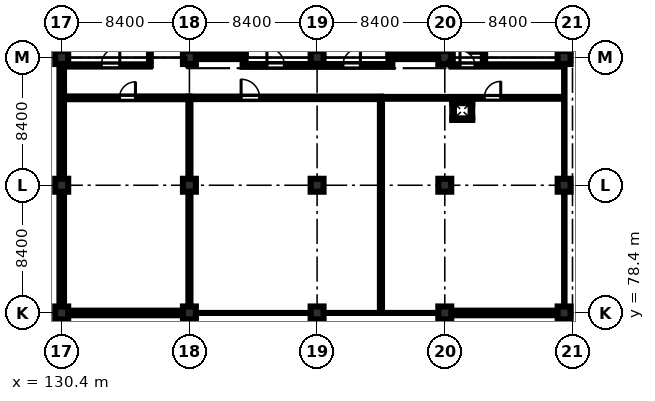
"""IFC4 building model, lengths in metres.
Left out: names, types, materials, properties, quantities, classifications, styles, units other than length and angle.
Written with IfcOpenShell. Run it as: python <this file> out.ifc"""

import sys

from ifc_helpers import new_model, si_unit, direction, frame, frame_2d, origin, origin_2d, place, context, subcontext, project, spatial, rectangle, extrude, element, fill, save


model = new_model("IFC4")
c1 = context("Model", 3, precision=1e-05, world=origin(), true_north=direction((0.0, 1.0)))
c2 = subcontext(c1, "Body", "Model", "MODEL_VIEW")
j1 = project(units=[si_unit("LENGTHUNIT", "METRE"), si_unit("PLANEANGLEUNIT", "RADIAN")], contexts=[c1])
p1 = place(None, origin())
s1 = spatial("IfcSite", under=j1, at=p1, CompositionType="ELEMENT")
p2 = place(p1, origin())
s2 = spatial("IfcBuilding", under=s1, at=p2, CompositionType="ELEMENT")
p3 = place(p2, frame((0.0, 0.0, 36.0)))
s3 = spatial("IfcBuildingStorey", under=s2, at=p3, CompositionType="ELEMENT", Elevation=36.0)
for number, where, z_axis, x_axis in (
    (1, (130.4, 78.4, 0.0), (0.0, 0.0, 1.0), (1.0, 0.0, 0.0)),
    (2, (130.4, 86.8, 0.0), (0.0, 0.0, 1.0), (1.0, 0.0, 0.0)),
    (3, (130.4, 95.2, 0.0), (0.0, 0.0, 1.0), (1.0, 0.0, 0.0)),
    (4, (138.8, 78.4, 0.0), (0.0, 0.0, 1.0), (1.0, 0.0, 0.0)),
    (5, (138.8, 86.8, 0.0), (0.0, 0.0, 1.0), (1.0, 0.0, 0.0)),
    (6, (138.8, 95.2, 0.0), (0.0, 0.0, 1.0), (1.0, 0.0, 0.0)),
    (7, (147.2, 78.4, 0.0), (0.0, 0.0, 1.0), (1.0, 0.0, 0.0)),
    (8, (147.2, 86.8, 0.0), (0.0, 0.0, 1.0), (1.0, 0.0, 0.0)),
    (9, (147.2, 95.2, 0.0), (0.0, 0.0, 1.0), (1.0, 0.0, 0.0)),
    (10, (155.6, 78.4, 0.0), (0.0, 0.0, 1.0), (1.0, 0.0, 0.0)),
    (11, (155.6, 86.8, 0.0), (0.0, 0.0, 1.0), (1.0, 0.0, 0.0)),
    (12, (155.6, 95.2, 0.0), (0.0, 0.0, 1.0), (1.0, 0.0, 0.0)),
    (13, (163.45, 78.4, 0.0), (0.0, 0.0, 1.0), (1.0, 0.0, 0.0)),
    (14, (163.45, 86.8, 0.0), (0.0, 0.0, 1.0), (1.0, 0.0, 0.0)),
    (15, (163.45, 95.2, 0.0), (0.0, 0.0, 1.0), (1.0, 0.0, 0.0)),
):
    element("IfcColumn", number, at=place(p3, frame(where, z_axis=z_axis, x_axis=x_axis)), inside=s3, PredefinedType="COLUMN", context=c2, shape_type="SweptSolid", body=[
        extrude(rectangle(XDim=0.85, YDim=0.85, at=origin_2d()), origin(), (0.0, 0.0, 1.0), 4.02),
    ])
p4 = place(p3, frame((138.7, 95.275, 0.0), z_axis=(0.0, 0.0, 1.0), x_axis=(1.0, 0.0, 0.0)))
e16 = element("IfcWall", 16, at=p4, inside=s3, PredefinedType="SHEAR", context=c2, shape_type="SweptSolid", body=[
    extrude(rectangle(XDim=3.8, YDim=0.35, at=frame_2d((1.9, 0.0))), origin(), (0.0, 0.0, 1.0), 4.02),
])
p5 = place(p3, frame((138.875, 95.45, 0.0), z_axis=(0.0, 0.0, 1.0), x_axis=(0.0, 1.0, 0.0)))
e17 = element("IfcWall", 17, at=p5, inside=s3, PredefinedType="SHEAR", context=c2, shape_type="SweptSolid", body=[
    extrude(rectangle(XDim=7.9, YDim=0.35, at=frame_2d((3.95, 0.0))), origin(), (0.0, 0.0, 1.0), 4.02),
])
p6 = place(p3, frame((142.325, 95.45, 0.0), z_axis=(0.0, 0.0, 1.0), x_axis=(0.0, 1.0, 0.0)))
e18 = element("IfcWall", 18, at=p6, inside=s3, PredefinedType="SHEAR", context=c2, shape_type="SweptSolid", body=[
    extrude(rectangle(XDim=7.9, YDim=0.35, at=frame_2d((3.95, 0.0))), origin(), (0.0, 0.0, 1.0), 4.02),
])
p7 = place(p6, frame((0.22, 0.0, 0.0)))
e19 = element("IfcOpeningElement", 19, at=p7, cuts=e18, PredefinedType="OPENING", context=c2, shape_type="SweptSolid", body=[
    extrude(rectangle(XDim=1.15, YDim=2.15, at=frame_2d((0.575, 1.075))), frame((0.0, 0.185, 0.0), z_axis=(0.0, -1.0, 0.0), x_axis=(1.0, 0.0, 0.0)), (0.0, 0.0, 1.0), 0.37),
])
p8 = place(p3, frame((151.9, 95.275, 0.0), z_axis=(0.0, 0.0, 1.0), x_axis=(1.0, 0.0, 0.0)))
e20 = element("IfcWall", 20, at=p8, inside=s3, PredefinedType="SHEAR", context=c2, shape_type="SweptSolid", body=[
    extrude(rectangle(XDim=3.8, YDim=0.35, at=frame_2d((1.9, 0.0))), origin(), (0.0, 0.0, 1.0), 4.02),
])
p9 = place(p3, frame((152.075, 95.45, 0.0), z_axis=(0.0, 0.0, 1.0), x_axis=(0.0, 1.0, 0.0)))
e21 = element("IfcWall", 21, at=p9, inside=s3, PredefinedType="SHEAR", context=c2, shape_type="SweptSolid", body=[
    extrude(rectangle(XDim=7.9, YDim=0.35, at=frame_2d((3.95, 0.0))), origin(), (0.0, 0.0, 1.0), 4.02),
])
p10 = place(p9, frame((0.35, 0.0, 0.0)))
e22 = element("IfcOpeningElement", 22, at=p10, cuts=e21, PredefinedType="OPENING", context=c2, shape_type="SweptSolid", body=[
    extrude(rectangle(XDim=1.15, YDim=2.15, at=frame_2d((0.575, 1.075))), frame((0.0, 0.185, 0.0), z_axis=(0.0, -1.0, 0.0), x_axis=(1.0, 0.0, 0.0)), (0.0, 0.0, 1.0), 0.37),
])
p11 = place(p3, frame((155.525, 95.45, 0.0), z_axis=(0.0, 0.0, 1.0), x_axis=(0.0, 1.0, 0.0)))
e23 = element("IfcWall", 23, at=p11, inside=s3, PredefinedType="SHEAR", context=c2, shape_type="SweptSolid", body=[
    extrude(rectangle(XDim=7.9, YDim=0.35, at=frame_2d((3.95, 0.0))), origin(), (0.0, 0.0, 1.0), 4.02),
])
p12 = place(p3, frame((138.375, 78.4, 0.0), z_axis=(0.0, 0.0, 1.0), x_axis=(-1.0, 0.0, 0.0)))
e24 = element("IfcWall", 24, at=p12, inside=s3, PredefinedType="STANDARD", context=c2, shape_type="SweptSolid", body=[
    extrude(rectangle(XDim=7.55, YDim=0.3, at=frame_2d((3.775, 0.0))), origin(), (0.0, 0.0, 1.0), 3.32),
])
p13 = place(p12, frame((1.15, 0.0, 0.95)))
e25 = element("IfcOpeningElement", 25, at=p13, cuts=e24, PredefinedType="OPENING", context=c2, shape_type="SweptSolid", body=[
    extrude(rectangle(XDim=2.15, YDim=1.95, at=frame_2d((1.075, 0.975))), frame((0.0, 0.16, 0.0), z_axis=(0.0, -1.0, 0.0), x_axis=(1.0, 0.0, 0.0)), (0.0, 0.0, 1.0), 0.32),
])
p14 = place(p3, frame((163.025, 78.4, 0.0), z_axis=(0.0, 0.0, 1.0), x_axis=(-1.0, 0.0, 0.0)))
e26 = element("IfcWall", 26, at=p14, inside=s3, PredefinedType="STANDARD", context=c2, shape_type="SweptSolid", body=[
    extrude(rectangle(XDim=7.0, YDim=0.3, at=frame_2d((3.5, 0.0))), origin(), (0.0, 0.0, 1.0), 3.32),
])
p15 = place(p14, frame((1.15, 0.0, 0.95)))
e27 = element("IfcOpeningElement", 27, at=p15, cuts=e26, PredefinedType="OPENING", context=c2, shape_type="SweptSolid", body=[
    extrude(rectangle(XDim=2.15, YDim=1.95, at=frame_2d((1.075, 0.975))), frame((0.0, 0.16, 0.0), z_axis=(0.0, -1.0, 0.0), x_axis=(1.0, 0.0, 0.0)), (0.0, 0.0, 1.0), 0.32),
])
p16 = place(p3, frame((130.4, 78.825, 0.0), z_axis=(0.0, 0.0, 1.0), x_axis=(0.0, 1.0, 0.0)))
e28 = element("IfcWall", 28, at=p16, inside=s3, PredefinedType="STANDARD", context=c2, shape_type="SweptSolid", body=[
    extrude(rectangle(XDim=7.55, YDim=0.3, at=frame_2d((3.775, 0.0))), origin(), (0.0, 0.0, 1.0), 3.32),
])
p17 = place(p16, frame((2.4, 0.0, 0.95)))
e29 = element("IfcOpeningElement", 29, at=p17, cuts=e28, PredefinedType="OPENING", context=c2, shape_type="SweptSolid", body=[
    extrude(rectangle(XDim=1.5, YDim=1.8, at=frame_2d((0.75, 0.9))), frame((0.0, 0.16, 0.0), z_axis=(0.0, -1.0, 0.0), x_axis=(1.0, 0.0, 0.0)), (0.0, 0.0, 1.0), 0.32),
])
p18 = place(p3, frame((130.4, 87.225, 0.0), z_axis=(0.0, 0.0, 1.0), x_axis=(0.0, 1.0, 0.0)))
e30 = element("IfcWall", 30, at=p18, inside=s3, PredefinedType="STANDARD", context=c2, shape_type="SweptSolid", body=[
    extrude(rectangle(XDim=7.55, YDim=0.3, at=frame_2d((3.775, 0.0))), origin(), (0.0, 0.0, 1.0), 3.32),
])
p19 = place(p18, frame((2.4, 0.0, 0.95)))
e31 = element("IfcOpeningElement", 31, at=p19, cuts=e30, PredefinedType="OPENING", context=c2, shape_type="SweptSolid", body=[
    extrude(rectangle(XDim=1.5, YDim=1.8, at=frame_2d((0.75, 0.9))), frame((0.0, 0.16, 0.0), z_axis=(0.0, -1.0, 0.0), x_axis=(1.0, 0.0, 0.0)), (0.0, 0.0, 1.0), 0.32),
])
p20 = place(p3, frame((142.3, 94.68, 0.0), z_axis=(0.0, 0.0, 1.0), x_axis=(1.0, 0.0, 0.0)))
e32 = element("IfcWall", 32, at=p20, inside=s3, PredefinedType="STANDARD", context=c2, shape_type="SweptSolid", body=[
    extrude(rectangle(XDim=4.8, YDim=0.18, at=frame_2d((2.4, 0.0))), origin(), (0.0, 0.0, 1.0), 4.02),
])
p21 = place(p20, frame((1.6, 0.0, 0.0)))
e33 = element("IfcOpeningElement", 33, at=p21, cuts=e32, PredefinedType="OPENING", context=c2, shape_type="SweptSolid", body=[
    extrude(rectangle(XDim=1.15, YDim=2.15, at=frame_2d((0.575, 1.075))), frame((0.0, 0.1, 0.0), z_axis=(0.0, -1.0, 0.0), x_axis=(1.0, 0.0, 0.0)), (0.0, 0.0, 1.0), 0.2),
])
p22 = place(p3, frame((147.3, 94.68, 0.0), z_axis=(0.0, 0.0, 1.0), x_axis=(1.0, 0.0, 0.0)))
e34 = element("IfcWall", 34, at=p22, inside=s3, PredefinedType="STANDARD", context=c2, shape_type="SweptSolid", body=[
    extrude(rectangle(XDim=4.85, YDim=0.18, at=frame_2d((2.425, 0.0))), origin(), (0.0, 0.0, 1.0), 4.02),
])
p23 = place(p22, frame((1.6, 0.0, 0.0)))
e35 = element("IfcOpeningElement", 35, at=p23, cuts=e34, PredefinedType="OPENING", context=c2, shape_type="SweptSolid", body=[
    extrude(rectangle(XDim=1.15, YDim=2.15, at=frame_2d((0.575, 1.075))), frame((0.0, 0.1, 0.0), z_axis=(0.0, -1.0, 0.0), x_axis=(1.0, 0.0, 0.0)), (0.0, 0.0, 1.0), 0.2),
])
p24 = place(p3, frame((156.05, 94.68, 0.0), z_axis=(0.0, 0.0, 1.0), x_axis=(1.0, 0.0, 0.0)))
e36 = element("IfcWall", 36, at=p24, inside=s3, PredefinedType="PARTITIONING", context=c2, shape_type="SweptSolid", body=[
    extrude(rectangle(XDim=7.15, YDim=0.15, at=frame_2d((3.575, 0.0))), origin(), (0.0, 0.0, 1.0), 4.02),
])
p25 = place(p24, frame((0.55, 0.0, 0.0)))
e37 = element("IfcOpeningElement", 37, at=p25, cuts=e36, PredefinedType="OPENING", context=c2, shape_type="SweptSolid", body=[
    extrude(rectangle(XDim=0.98, YDim=2.12, at=frame_2d((0.49, 1.06))), frame((0.0, 0.085, 0.0), z_axis=(0.0, -1.0, 0.0), x_axis=(1.0, 0.0, 0.0)), (0.0, 0.0, 1.0), 0.17),
])
p26 = place(p3, frame((158.18, 94.68, 0.0), z_axis=(0.0, 0.0, 1.0), x_axis=(0.0, 1.0, 0.0)))
e38 = element("IfcWall", 38, at=p26, inside=s3, PredefinedType="PARTITIONING", context=c2, shape_type="SweptSolid", body=[
    extrude(rectangle(XDim=8.57, YDim=0.15, at=frame_2d((4.285, 0.0))), origin(), (0.0, 0.0, 1.0), 4.02),
])
p27 = place(p26, frame((0.8, 0.0, 0.0)))
e39 = element("IfcOpeningElement", 39, at=p27, cuts=e38, PredefinedType="OPENING", context=c2, shape_type="SweptSolid", body=[
    extrude(rectangle(XDim=1.0, YDim=2.12, at=frame_2d((0.5, 1.06))), frame((0.0, 0.085, 0.0), z_axis=(0.0, -1.0, 0.0), x_axis=(1.0, 0.0, 0.0)), (0.0, 0.0, 1.0), 0.17),
])
p28 = place(p26, frame((3.5, 0.0, 0.0)))
e40 = element("IfcOpeningElement", 40, at=p28, cuts=e38, PredefinedType="OPENING", context=c2, shape_type="SweptSolid", body=[
    extrude(rectangle(XDim=0.92, YDim=2.1, at=frame_2d((0.46, 1.05))), frame((0.0, 0.085, 0.0), z_axis=(0.0, -1.0, 0.0), x_axis=(1.0, 0.0, 0.0)), (0.0, 0.0, 1.0), 0.17),
])
p29 = place(p26, frame((6.4, 0.0, 0.0)))
e41 = element("IfcOpeningElement", 41, at=p29, cuts=e38, PredefinedType="OPENING", context=c2, shape_type="SweptSolid", body=[
    extrude(rectangle(XDim=0.92, YDim=2.1, at=frame_2d((0.46, 1.05))), frame((0.0, 0.085, 0.0), z_axis=(0.0, -1.0, 0.0), x_axis=(1.0, 0.0, 0.0)), (0.0, 0.0, 1.0), 0.17),
])
p30 = place(p3, frame((156.05, 94.68, 0.0), z_axis=(0.0, 0.0, 1.0), x_axis=(0.0, 1.0, 0.0)))
e42 = element("IfcWall", 42, at=p30, inside=s3, PredefinedType="PARTITIONING", context=c2, shape_type="SweptSolid", body=[
    extrude(rectangle(XDim=8.57, YDim=0.15, at=frame_2d((4.285, 0.0))), origin(), (0.0, 0.0, 1.0), 4.02),
])
p31 = place(p3, frame((136.2, 94.68, 0.0), z_axis=(0.0, 0.0, 1.0), x_axis=(0.0, 1.0, 0.0)))
e43 = element("IfcWall", 43, at=p31, inside=s3, PredefinedType="PARTITIONING", context=c2, shape_type="SweptSolid", body=[
    extrude(rectangle(XDim=9.07, YDim=0.12, at=frame_2d((4.535, 0.0))), origin(), (0.0, 0.0, 1.0), 4.02),
])
p32 = place(p3, frame((130.8, 94.68, 0.0), z_axis=(0.0, 0.0, 1.0), x_axis=(1.0, 0.0, 0.0)))
e44 = element("IfcWall", 44, at=p32, inside=s3, PredefinedType="PARTITIONING", context=c2, shape_type="SweptSolid", body=[
    extrude(rectangle(XDim=5.4, YDim=0.145, at=frame_2d((2.7, 0.0))), origin(), (0.0, 0.0, 1.0), 4.02),
])
p33 = place(p32, frame((2.2, 0.0, 0.0)))
e45 = element("IfcOpeningElement", 45, at=p33, cuts=e44, PredefinedType="OPENING", context=c2, shape_type="SweptSolid", body=[
    extrude(rectangle(XDim=1.22, YDim=2.2, at=frame_2d((0.61, 1.1))), frame((0.0, 0.083, 0.0), z_axis=(0.0, -1.0, 0.0), x_axis=(1.0, 0.0, 0.0)), (0.0, 0.0, 1.0), 0.165),
])
p34 = place(p3, frame((130.55, 92.55, 0.0), z_axis=(0.0, 0.0, 1.0), x_axis=(1.0, 0.0, 0.0)))
e46 = element("IfcWall", 46, at=p34, inside=s3, PredefinedType="STANDARD", context=c2, shape_type="SweptSolid", body=[
    extrude(rectangle(XDim=8.25, YDim=0.18, at=frame_2d((4.125, 0.0))), origin(), (0.0, 0.0, 1.0), 4.02),
])
p35 = place(p34, frame((3.65, 0.0, 0.0)))
e47 = element("IfcOpeningElement", 47, at=p35, cuts=e46, PredefinedType="OPENING", context=c2, shape_type="SweptSolid", body=[
    extrude(rectangle(XDim=1.05, YDim=2.15, at=frame_2d((0.525, 1.075))), frame((0.0, 0.1, 0.0), z_axis=(0.0, -1.0, 0.0), x_axis=(1.0, 0.0, 0.0)), (0.0, 0.0, 1.0), 0.2),
])
p36 = place(p3, frame((138.8, 92.55, 0.0), z_axis=(0.0, 0.0, 1.0), x_axis=(1.0, 0.0, 0.0)))
e48 = element("IfcWall", 48, at=p36, inside=s3, PredefinedType="PARTITIONING", context=c2, shape_type="SweptSolid", body=[
    extrude(rectangle(XDim=12.6, YDim=0.165, at=frame_2d((6.3, 0.0))), origin(), (0.0, 0.0, 1.0), 4.02),
])
p37 = place(p36, frame((3.4, 0.0, 0.0)))
e49 = element("IfcOpeningElement", 49, at=p37, cuts=e48, PredefinedType="OPENING", context=c2, shape_type="SweptSolid", body=[
    extrude(rectangle(XDim=1.22, YDim=2.2, at=frame_2d((0.61, 1.1))), frame((0.0, 0.093, 0.0), z_axis=(0.0, -1.0, 0.0), x_axis=(1.0, 0.0, 0.0)), (0.0, 0.0, 1.0), 0.185),
])
p38 = place(p3, frame((138.8, 78.55, 0.0), z_axis=(0.0, 0.0, 1.0), x_axis=(0.0, 1.0, 0.0)))
e50 = element("IfcWall", 50, at=p38, inside=s3, PredefinedType="PARTITIONING", context=c2, shape_type="SweptSolid", body=[
    extrude(rectangle(XDim=14.0, YDim=0.135, at=frame_2d((7.0, 0.0))), origin(), (0.0, 0.0, 1.0), 3.32),
])
p39 = place(p3, frame((151.4, 92.55, 0.0), z_axis=(0.0, 0.0, 1.0), x_axis=(1.0, 0.0, 0.0)))
e51 = element("IfcWall", 51, at=p39, inside=s3, PredefinedType="PARTITIONING", context=c2, shape_type="SweptSolid", body=[
    extrude(rectangle(XDim=11.95, YDim=0.12, at=frame_2d((5.975, 0.0))), origin(), (0.0, 0.0, 1.0), 4.02),
])
p40 = place(p39, frame((6.8, 0.0, 0.0)))
e52 = element("IfcOpeningElement", 52, at=p40, cuts=e51, PredefinedType="OPENING", context=c2, shape_type="SweptSolid", body=[
    extrude(rectangle(XDim=1.08, YDim=2.15, at=frame_2d((0.54, 1.075))), frame((0.0, 0.07, 0.0), z_axis=(0.0, -1.0, 0.0), x_axis=(1.0, 0.0, 0.0)), (0.0, 0.0, 1.0), 0.14),
])
p41 = place(p3, frame((151.4, 78.55, 0.0), z_axis=(0.0, 0.0, 1.0), x_axis=(0.0, 1.0, 0.0)))
e53 = element("IfcWall", 53, at=p41, inside=s3, PredefinedType="PARTITIONING", context=c2, shape_type="SweptSolid", body=[
    extrude(rectangle(XDim=14.0, YDim=0.135, at=frame_2d((7.0, 0.0))), origin(), (0.0, 0.0, 1.0), 3.52),
])
for number, where, z_axis, x_axis in (
    (54, (156.095, 91.147, 0.0), (0.0, 0.0, 1.0), (1.0, 0.0, 0.0)),
    (55, (156.095, 92.252, 0.0), (0.0, 0.0, 1.0), (1.0, 0.0, 0.0)),
):
    element("IfcWall", number, at=place(p3, frame(where, z_axis=z_axis, x_axis=x_axis)), inside=s3, PredefinedType="PARTITIONING", context=c2, shape_type="SweptSolid", body=[
        extrude(rectangle(XDim=1.31, YDim=0.105, at=frame_2d((0.655, 0.0))), origin(), (0.0, 0.0, 1.0), 4.02),
    ])
for number, where, z_axis, x_axis in (
    (56, (156.147, 91.2, 0.0), (0.0, 0.0, 1.0), (0.0, 1.0, 0.0)),
    (57, (157.353, 91.2, 0.0), (0.0, 0.0, 1.0), (0.0, 1.0, 0.0)),
):
    element("IfcWall", number, at=place(p3, frame(where, z_axis=z_axis, x_axis=x_axis)), inside=s3, PredefinedType="PARTITIONING", context=c2, shape_type="SweptSolid", body=[
        extrude(rectangle(XDim=1.0, YDim=0.105, at=frame_2d((0.5, 0.0))), origin(), (0.0, 0.0, 1.0), 4.02),
    ])
p42 = place(p13, origin())
e58 = element("IfcWindow", 58, at=p42, inside=s3, PartitioningType="DOUBLE_PANEL_VERTICAL", PredefinedType="WINDOW", context=c2, shape_type="SweptSolid", body=[
    extrude(rectangle(XDim=2.15, YDim=1.95, at=frame_2d((1.075, 0.975))), frame((0.0, 0.03, 0.0), z_axis=(0.0, -1.0, 0.0), x_axis=(1.0, 0.0, 0.0)), (0.0, 0.0, 1.0), 0.06),
])
fill(e25, e58)
p43 = place(p15, origin())
e59 = element("IfcWindow", 59, at=p43, inside=s3, PartitioningType="DOUBLE_PANEL_VERTICAL", PredefinedType="WINDOW", context=c2, shape_type="SweptSolid", body=[
    extrude(rectangle(XDim=2.15, YDim=1.95, at=frame_2d((1.075, 0.975))), frame((0.0, 0.03, 0.0), z_axis=(0.0, -1.0, 0.0), x_axis=(1.0, 0.0, 0.0)), (0.0, 0.0, 1.0), 0.06),
])
fill(e27, e59)
p44 = place(p17, origin())
e60 = element("IfcWindow", 60, at=p44, inside=s3, PartitioningType="DOUBLE_PANEL_VERTICAL", PredefinedType="WINDOW", context=c2, shape_type="SweptSolid", body=[
    extrude(rectangle(XDim=1.5, YDim=1.8, at=frame_2d((0.75, 0.9))), frame((0.0, 0.03, 0.0), z_axis=(0.0, -1.0, 0.0), x_axis=(1.0, 0.0, 0.0)), (0.0, 0.0, 1.0), 0.06),
])
fill(e29, e60)
p45 = place(p19, origin())
e61 = element("IfcWindow", 61, at=p45, inside=s3, PartitioningType="DOUBLE_PANEL_VERTICAL", PredefinedType="WINDOW", context=c2, shape_type="SweptSolid", body=[
    extrude(rectangle(XDim=1.5, YDim=1.8, at=frame_2d((0.75, 0.9))), frame((0.0, 0.03, 0.0), z_axis=(0.0, -1.0, 0.0), x_axis=(1.0, 0.0, 0.0)), (0.0, 0.0, 1.0), 0.06),
])
fill(e31, e61)
p46 = place(p21, origin())
e62 = element("IfcDoor", 62, at=p46, inside=s3, OperationType="SINGLE_SWING_LEFT", PredefinedType="DOOR", context=c2, shape_type="SweptSolid", body=[
    extrude(rectangle(XDim=1.15, YDim=2.15, at=frame_2d((0.575, 1.075))), frame((0.0, 0.025, 0.0), z_axis=(0.0, -1.0, 0.0), x_axis=(1.0, 0.0, 0.0)), (0.0, 0.0, 1.0), 0.05),
])
fill(e33, e62)
p47 = place(p23, origin())
e63 = element("IfcDoor", 63, at=p47, inside=s3, OperationType="SINGLE_SWING_RIGHT", PredefinedType="DOOR", context=c2, shape_type="SweptSolid", body=[
    extrude(rectangle(XDim=1.15, YDim=2.15, at=frame_2d((0.575, 1.075))), frame((0.0, 0.025, 0.0), z_axis=(0.0, -1.0, 0.0), x_axis=(1.0, 0.0, 0.0)), (0.0, 0.0, 1.0), 0.05),
])
fill(e35, e63)
p48 = place(p25, origin())
e64 = element("IfcDoor", 64, at=p48, inside=s3, OperationType="SINGLE_SWING_LEFT", PredefinedType="DOOR", context=c2, shape_type="SweptSolid", body=[
    extrude(rectangle(XDim=0.98, YDim=2.12, at=frame_2d((0.49, 1.06))), frame((0.0, 0.025, 0.0), z_axis=(0.0, -1.0, 0.0), x_axis=(1.0, 0.0, 0.0)), (0.0, 0.0, 1.0), 0.05),
])
fill(e37, e64)
p49 = place(p27, origin())
e65 = element("IfcDoor", 65, at=p49, inside=s3, OperationType="SINGLE_SWING_LEFT", PredefinedType="DOOR", context=c2, shape_type="SweptSolid", body=[
    extrude(rectangle(XDim=1.0, YDim=2.12, at=frame_2d((0.5, 1.06))), frame((0.0, 0.025, 0.0), z_axis=(0.0, -1.0, 0.0), x_axis=(1.0, 0.0, 0.0)), (0.0, 0.0, 1.0), 0.05),
])
fill(e39, e65)
p50 = place(p33, origin())
e66 = element("IfcDoor", 66, at=p50, inside=s3, OperationType="SINGLE_SWING_RIGHT", PredefinedType="DOOR", context=c2, shape_type="SweptSolid", body=[
    extrude(rectangle(XDim=1.22, YDim=2.2, at=frame_2d((0.61, 1.1))), frame((0.0, 0.025, 0.0), z_axis=(0.0, -1.0, 0.0), x_axis=(1.0, 0.0, 0.0)), (0.0, 0.0, 1.0), 0.05),
])
fill(e45, e66)
p51 = place(p35, origin())
e67 = element("IfcDoor", 67, at=p51, inside=s3, OperationType="SINGLE_SWING_RIGHT", PredefinedType="DOOR", context=c2, shape_type="SweptSolid", body=[
    extrude(rectangle(XDim=1.05, YDim=2.15, at=frame_2d((0.525, 1.075))), frame((0.0, 0.025, 0.0), z_axis=(0.0, -1.0, 0.0), x_axis=(1.0, 0.0, 0.0)), (0.0, 0.0, 1.0), 0.05),
])
fill(e47, e67)
p52 = place(p37, origin())
e68 = element("IfcDoor", 68, at=p52, inside=s3, OperationType="SINGLE_SWING_LEFT", PredefinedType="DOOR", context=c2, shape_type="SweptSolid", body=[
    extrude(rectangle(XDim=1.22, YDim=2.2, at=frame_2d((0.61, 1.1))), frame((0.0, 0.025, 0.0), z_axis=(0.0, -1.0, 0.0), x_axis=(1.0, 0.0, 0.0)), (0.0, 0.0, 1.0), 0.05),
])
fill(e49, e68)
p53 = place(p40, origin())
e69 = element("IfcDoor", 69, at=p53, inside=s3, OperationType="SINGLE_SWING_RIGHT", PredefinedType="DOOR", context=c2, shape_type="SweptSolid", body=[
    extrude(rectangle(XDim=1.08, YDim=2.15, at=frame_2d((0.54, 1.075))), frame((0.0, 0.025, 0.0), z_axis=(0.0, -1.0, 0.0), x_axis=(1.0, 0.0, 0.0)), (0.0, 0.0, 1.0), 0.05),
])
fill(e52, e69)
save(model, sys.argv[1])
